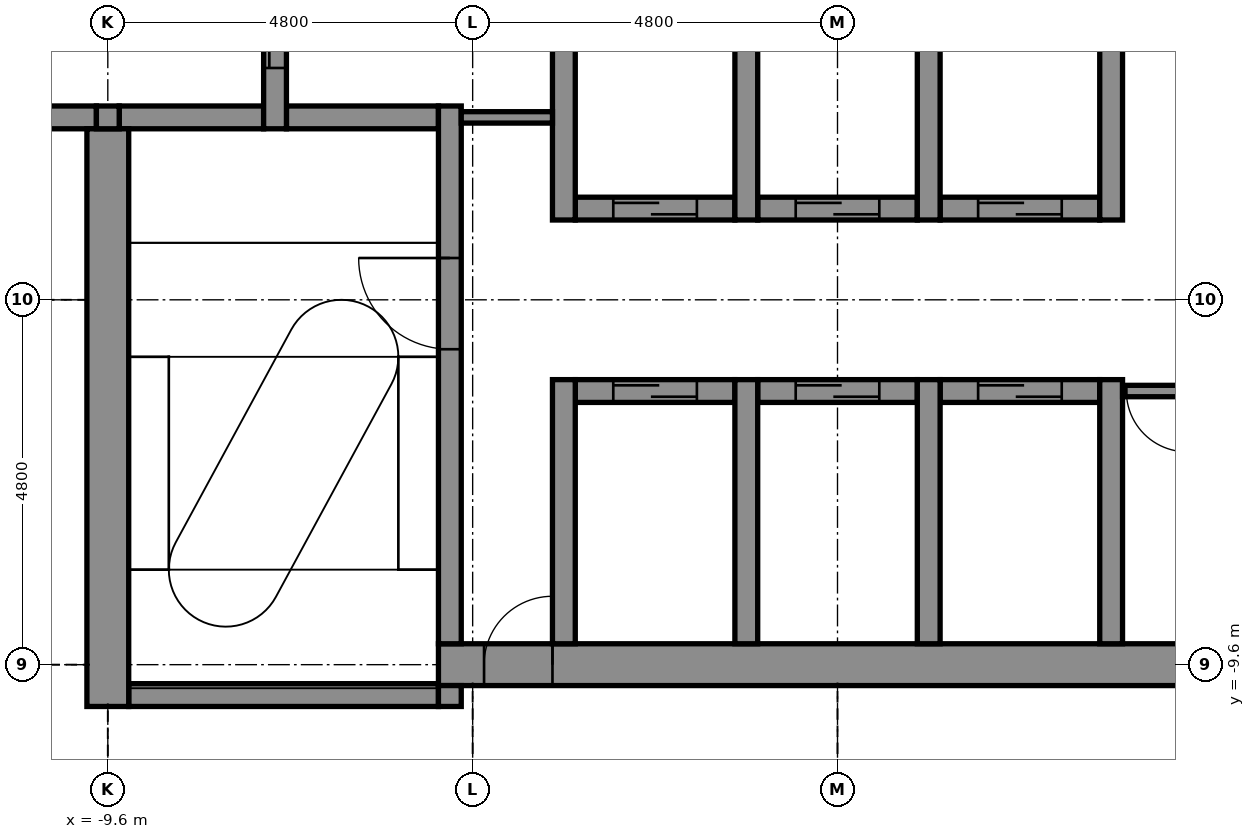
"""IFC4 building model, lengths in metres.
Left out: names, types, materials, properties, quantities, classifications, styles, units other than length and angle.
Written with IfcOpenShell. Run it as: python <this file> out.ifc"""

import sys

from ifc_helpers import new_model, si_unit, direction, frame, frame_2d, origin, place, context, subcontext, project, spatial, rectangle, extrude, element, fill, save


model = new_model("IFC4")
c1 = context("Model", 3, precision=1e-05, world=origin(), true_north=direction((0.0, 1.0)))
c2 = subcontext(c1, "Body", "Model", "MODEL_VIEW")
j1 = project(units=[si_unit("LENGTHUNIT", "METRE"), si_unit("PLANEANGLEUNIT", "RADIAN")], contexts=[c1])
p1 = place(None, origin())
s1 = spatial("IfcSite", under=j1, at=p1, CompositionType="ELEMENT")
p2 = place(p1, origin())
s2 = spatial("IfcBuilding", under=s1, at=p2, CompositionType="ELEMENT")
p3 = place(p2, frame((0.0, 0.0, 273.5)))
s3 = spatial("IfcBuildingStorey", under=s2, at=p3, CompositionType="ELEMENT", Elevation=273.5)
p4 = place(p3, frame((-9.325, -10.0, -0.15), z_axis=(0.0, 0.0, 1.0), x_axis=(1.0, 0.0, 0.0)))
e1 = element("IfcWall", 1, at=p4, inside=s3, PredefinedType="STANDARD", context=c2, shape_type="SweptSolid", body=[
    extrude(rectangle(XDim=4.075, YDim=0.3, at=frame_2d((2.038, 0.0))), origin(), (0.0, 0.0, 1.0), 3.9),
])
p5 = place(p3, frame((-5.25, -9.6, -0.15), z_axis=(0.0, 0.0, 1.0), x_axis=(1.0, 0.0, 0.0)))
e2 = element("IfcWall", 2, at=p5, inside=s3, PredefinedType="SHEAR", context=c2, shape_type="SweptSolid", body=[
    extrude(rectangle(XDim=10.2, YDim=0.55, at=frame_2d((5.1, 0.0))), origin(), (0.0, 0.0, 1.0), 3.9),
])
p6 = place(p5, frame((0.6, 0.0, 0.15)))
e3 = element("IfcOpeningElement", 3, at=p6, cuts=e2, PredefinedType="OPENING", context=c2, shape_type="SweptSolid", body=[
    extrude(rectangle(XDim=0.9, YDim=2.1, at=frame_2d((0.45, 1.05))), frame((0.0, 0.285, 0.0), z_axis=(0.0, -1.0, 0.0), x_axis=(1.0, 0.0, 0.0)), (0.0, 0.0, 1.0), 0.57),
])
p7 = place(p3, frame((-3.45, -6.0, -0.15), z_axis=(0.0, 0.0, 1.0), x_axis=(1.0, 0.0, 0.0)))
e4 = element("IfcWall", 4, at=p7, inside=s3, PredefinedType="STANDARD", context=c2, shape_type="SweptSolid", body=[
    extrude(rectangle(XDim=2.1, YDim=0.3, at=frame_2d((1.05, 0.0))), origin(), (0.0, 0.0, 1.0), 3.9),
])
p8 = place(p7, frame((0.5, 0.0, 0.15)))
e5 = element("IfcOpeningElement", 5, at=p8, cuts=e4, PredefinedType="OPENING", context=c2, shape_type="SweptSolid", body=[
    extrude(rectangle(XDim=1.1, YDim=2.1, at=frame_2d((0.55, 1.05))), frame((0.0, 0.16, 0.0), z_axis=(0.0, -1.0, 0.0), x_axis=(1.0, 0.0, 0.0)), (0.0, 0.0, 1.0), 0.32),
])
p9 = place(p3, frame((-1.05, -6.0, -0.15), z_axis=(0.0, 0.0, 1.0), x_axis=(1.0, 0.0, 0.0)))
e6 = element("IfcWall", 6, at=p9, inside=s3, PredefinedType="STANDARD", context=c2, shape_type="SweptSolid", body=[
    extrude(rectangle(XDim=2.1, YDim=0.3, at=frame_2d((1.05, 0.0))), origin(), (0.0, 0.0, 1.0), 3.9),
])
p10 = place(p9, frame((0.5, 0.0, 0.15)))
e7 = element("IfcOpeningElement", 7, at=p10, cuts=e6, PredefinedType="OPENING", context=c2, shape_type="SweptSolid", body=[
    extrude(rectangle(XDim=1.1, YDim=2.1, at=frame_2d((0.55, 1.05))), frame((0.0, 0.16, 0.0), z_axis=(0.0, -1.0, 0.0), x_axis=(1.0, 0.0, 0.0)), (0.0, 0.0, 1.0), 0.32),
])
p11 = place(p3, frame((1.35, -6.0, -0.15), z_axis=(0.0, 0.0, 1.0), x_axis=(1.0, 0.0, 0.0)))
e8 = element("IfcWall", 8, at=p11, inside=s3, PredefinedType="STANDARD", context=c2, shape_type="SweptSolid", body=[
    extrude(rectangle(XDim=2.1, YDim=0.3, at=frame_2d((1.05, 0.0))), origin(), (0.0, 0.0, 1.0), 3.9),
])
p12 = place(p11, frame((0.5, 0.0, 0.15)))
e9 = element("IfcOpeningElement", 9, at=p12, cuts=e8, PredefinedType="OPENING", context=c2, shape_type="SweptSolid", body=[
    extrude(rectangle(XDim=1.1, YDim=2.1, at=frame_2d((0.55, 1.05))), frame((0.0, 0.16, 0.0), z_axis=(0.0, -1.0, 0.0), x_axis=(1.0, 0.0, 0.0)), (0.0, 0.0, 1.0), 0.32),
])
p13 = place(p3, frame((-3.45, -3.6, -0.15), z_axis=(0.0, 0.0, 1.0), x_axis=(1.0, 0.0, 0.0)))
e10 = element("IfcWall", 10, at=p13, inside=s3, PredefinedType="STANDARD", context=c2, shape_type="SweptSolid", body=[
    extrude(rectangle(XDim=2.1, YDim=0.3, at=frame_2d((1.05, 0.0))), origin(), (0.0, 0.0, 1.0), 3.9),
])
p14 = place(p13, frame((0.5, 0.0, 0.15)))
e11 = element("IfcOpeningElement", 11, at=p14, cuts=e10, PredefinedType="OPENING", context=c2, shape_type="SweptSolid", body=[
    extrude(rectangle(XDim=1.1, YDim=2.1, at=frame_2d((0.55, 1.05))), frame((0.0, 0.16, 0.0), z_axis=(0.0, -1.0, 0.0), x_axis=(1.0, 0.0, 0.0)), (0.0, 0.0, 1.0), 0.32),
])
p15 = place(p3, frame((-1.05, -3.6, -0.15), z_axis=(0.0, 0.0, 1.0), x_axis=(1.0, 0.0, 0.0)))
e12 = element("IfcWall", 12, at=p15, inside=s3, PredefinedType="STANDARD", context=c2, shape_type="SweptSolid", body=[
    extrude(rectangle(XDim=2.1, YDim=0.3, at=frame_2d((1.05, 0.0))), origin(), (0.0, 0.0, 1.0), 3.9),
])
p16 = place(p15, frame((0.5, 0.0, 0.15)))
e13 = element("IfcOpeningElement", 13, at=p16, cuts=e12, PredefinedType="OPENING", context=c2, shape_type="SweptSolid", body=[
    extrude(rectangle(XDim=1.1, YDim=2.1, at=frame_2d((0.55, 1.05))), frame((0.0, 0.16, 0.0), z_axis=(0.0, -1.0, 0.0), x_axis=(1.0, 0.0, 0.0)), (0.0, 0.0, 1.0), 0.32),
])
p17 = place(p3, frame((1.35, -3.6, -0.15), z_axis=(0.0, 0.0, 1.0), x_axis=(1.0, 0.0, 0.0)))
e14 = element("IfcWall", 14, at=p17, inside=s3, PredefinedType="STANDARD", context=c2, shape_type="SweptSolid", body=[
    extrude(rectangle(XDim=2.1, YDim=0.3, at=frame_2d((1.05, 0.0))), origin(), (0.0, 0.0, 1.0), 3.9),
])
p18 = place(p17, frame((0.5, 0.0, 0.15)))
e15 = element("IfcOpeningElement", 15, at=p18, cuts=e14, PredefinedType="OPENING", context=c2, shape_type="SweptSolid", body=[
    extrude(rectangle(XDim=1.1, YDim=2.1, at=frame_2d((0.55, 1.05))), frame((0.0, 0.16, 0.0), z_axis=(0.0, -1.0, 0.0), x_axis=(1.0, 0.0, 0.0)), (0.0, 0.0, 1.0), 0.32),
])
p19 = place(p3, frame((-10.85, -2.4, -0.15), z_axis=(0.0, 0.0, 1.0), x_axis=(1.0, 0.0, 0.0)))
e16 = element("IfcWall", 16, at=p19, inside=s3, PredefinedType="STANDARD", context=c2, shape_type="SweptSolid", body=[
    extrude(rectangle(XDim=1.1, YDim=0.3, at=frame_2d((0.55, 0.0))), origin(), (0.0, 0.0, 1.0), 3.9),
])
p20 = place(p3, frame((-9.45, -2.4, -0.15), z_axis=(0.0, 0.0, 1.0), x_axis=(1.0, 0.0, 0.0)))
e17 = element("IfcWall", 17, at=p20, inside=s3, PredefinedType="STANDARD", context=c2, shape_type="SweptSolid", body=[
    extrude(rectangle(XDim=1.9, YDim=0.3, at=frame_2d((0.95, 0.0))), origin(), (0.0, 0.0, 1.0), 3.9),
])
p21 = place(p3, frame((-7.25, -2.4, -0.15), z_axis=(0.0, 0.0, 1.0), x_axis=(1.0, 0.0, 0.0)))
e18 = element("IfcWall", 18, at=p21, inside=s3, PredefinedType="STANDARD", context=c2, shape_type="SweptSolid", body=[
    extrude(rectangle(XDim=2.0, YDim=0.3, at=frame_2d((1.0, 0.0))), origin(), (0.0, 0.0, 1.0), 3.9),
])
p22 = place(p3, frame((-9.6, -10.15, -0.15), z_axis=(0.0, 0.0, 1.0), x_axis=(0.0, 1.0, 0.0)))
e19 = element("IfcWall", 19, at=p22, inside=s3, PredefinedType="SHEAR", context=c2, shape_type="SweptSolid", body=[
    extrude(rectangle(XDim=7.6, YDim=0.55, at=frame_2d((3.8, 0.0))), origin(), (0.0, 0.0, 1.0), 3.9),
])
p23 = place(p3, frame((-9.6, -2.55, -0.15), z_axis=(0.0, 0.0, 1.0), x_axis=(0.0, 1.0, 0.0)))
e20 = element("IfcWall", 20, at=p23, inside=s3, PredefinedType="STANDARD", context=c2, shape_type="SweptSolid", body=[
    extrude(rectangle(XDim=0.3, YDim=0.3, at=frame_2d((0.15, 0.0))), origin(), (0.0, 0.0, 1.0), 3.9),
])
p24 = place(p3, frame((-7.4, -2.55, -0.15), z_axis=(0.0, 0.0, 1.0), x_axis=(0.0, 1.0, 0.0)))
e21 = element("IfcWall", 21, at=p24, inside=s3, PredefinedType="STANDARD", context=c2, shape_type="SweptSolid", body=[
    extrude(rectangle(XDim=5.1, YDim=0.3, at=frame_2d((2.55, 0.0))), origin(), (0.0, 0.0, 1.0), 3.9),
])
p25 = place(p24, frame((0.8, 0.0, 0.15)))
e22 = element("IfcOpeningElement", 22, at=p25, cuts=e21, PredefinedType="OPENING", context=c2, shape_type="SweptSolid", body=[
    extrude(rectangle(XDim=1.1, YDim=2.1, at=frame_2d((0.55, 1.05))), frame((0.0, 0.16, 0.0), z_axis=(0.0, -1.0, 0.0), x_axis=(1.0, 0.0, 0.0)), (0.0, 0.0, 1.0), 0.32),
])
p26 = place(p24, frame((3.2, 0.0, 0.15)))
e23 = element("IfcOpeningElement", 23, at=p26, cuts=e21, PredefinedType="OPENING", context=c2, shape_type="SweptSolid", body=[
    extrude(rectangle(XDim=1.1, YDim=2.1, at=frame_2d((0.55, 1.05))), frame((0.0, 0.16, 0.0), z_axis=(0.0, -1.0, 0.0), x_axis=(1.0, 0.0, 0.0)), (0.0, 0.0, 1.0), 0.32),
])
p27 = place(p3, frame((-5.1, -10.15, -0.15), z_axis=(0.0, 0.0, 1.0), x_axis=(0.0, 1.0, 0.0)))
e24 = element("IfcWall", 24, at=p27, inside=s3, PredefinedType="STANDARD", context=c2, shape_type="SweptSolid", body=[
    extrude(rectangle(XDim=0.275, YDim=0.3, at=frame_2d((0.137, 0.0))), origin(), (0.0, 0.0, 1.0), 3.9),
])
p28 = place(p3, frame((-5.1, -9.325, -0.15), z_axis=(0.0, 0.0, 1.0), x_axis=(0.0, 1.0, 0.0)))
e25 = element("IfcWall", 25, at=p28, inside=s3, PredefinedType="STANDARD", context=c2, shape_type="SweptSolid", body=[
    extrude(rectangle(XDim=7.075, YDim=0.3, at=frame_2d((3.538, 0.0))), origin(), (0.0, 0.0, 1.0), 3.9),
])
p29 = place(p28, frame((3.875, 0.0, 0.15)))
e26 = element("IfcOpeningElement", 26, at=p29, cuts=e25, PredefinedType="OPENING", context=c2, shape_type="SweptSolid", body=[
    extrude(rectangle(XDim=1.2, YDim=2.1, at=frame_2d((0.6, 1.05))), frame((0.0, 0.16, 0.0), z_axis=(0.0, -1.0, 0.0), x_axis=(1.0, 0.0, 0.0)), (0.0, 0.0, 1.0), 0.32),
])
p30 = place(p3, frame((-3.6, -9.325, -0.15), z_axis=(0.0, 0.0, 1.0), x_axis=(0.0, 1.0, 0.0)))
e27 = element("IfcWall", 27, at=p30, inside=s3, PredefinedType="STANDARD", context=c2, shape_type="SweptSolid", body=[
    extrude(rectangle(XDim=3.475, YDim=0.3, at=frame_2d((1.737, 0.0))), origin(), (0.0, 0.0, 1.0), 3.9),
])
p31 = place(p3, frame((-3.6, -3.75, -0.15), z_axis=(0.0, 0.0, 1.0), x_axis=(0.0, 1.0, 0.0)))
e28 = element("IfcWall", 28, at=p31, inside=s3, PredefinedType="STANDARD", context=c2, shape_type="SweptSolid", body=[
    extrude(rectangle(XDim=7.5, YDim=0.3, at=frame_2d((3.75, 0.0))), origin(), (0.0, 0.0, 1.0), 3.9),
])
p32 = place(p3, frame((-1.2, -9.325, -0.15), z_axis=(0.0, 0.0, 1.0), x_axis=(0.0, 1.0, 0.0)))
e29 = element("IfcWall", 29, at=p32, inside=s3, PredefinedType="STANDARD", context=c2, shape_type="SweptSolid", body=[
    extrude(rectangle(XDim=3.475, YDim=0.3, at=frame_2d((1.737, 0.0))), origin(), (0.0, 0.0, 1.0), 3.9),
])
p33 = place(p3, frame((-1.2, -3.75, -0.15), z_axis=(0.0, 0.0, 1.0), x_axis=(0.0, 1.0, 0.0)))
e30 = element("IfcWall", 30, at=p33, inside=s3, PredefinedType="STANDARD", context=c2, shape_type="SweptSolid", body=[
    extrude(rectangle(XDim=7.5, YDim=0.3, at=frame_2d((3.75, 0.0))), origin(), (0.0, 0.0, 1.0), 3.9),
])
p34 = place(p3, frame((1.2, -9.325, -0.15), z_axis=(0.0, 0.0, 1.0), x_axis=(0.0, 1.0, 0.0)))
e31 = element("IfcWall", 31, at=p34, inside=s3, PredefinedType="STANDARD", context=c2, shape_type="SweptSolid", body=[
    extrude(rectangle(XDim=3.475, YDim=0.3, at=frame_2d((1.737, 0.0))), origin(), (0.0, 0.0, 1.0), 3.9),
])
p35 = place(p3, frame((1.2, -3.75, -0.15), z_axis=(0.0, 0.0, 1.0), x_axis=(0.0, 1.0, 0.0)))
e32 = element("IfcWall", 32, at=p35, inside=s3, PredefinedType="STANDARD", context=c2, shape_type="SweptSolid", body=[
    extrude(rectangle(XDim=7.5, YDim=0.3, at=frame_2d((3.75, 0.0))), origin(), (0.0, 0.0, 1.0), 3.9),
])
p36 = place(p3, frame((3.6, -9.325, -0.15), z_axis=(0.0, 0.0, 1.0), x_axis=(0.0, 1.0, 0.0)))
e33 = element("IfcWall", 33, at=p36, inside=s3, PredefinedType="STANDARD", context=c2, shape_type="SweptSolid", body=[
    extrude(rectangle(XDim=3.475, YDim=0.3, at=frame_2d((1.737, 0.0))), origin(), (0.0, 0.0, 1.0), 3.9),
])
p37 = place(p3, frame((3.6, -3.75, -0.15), z_axis=(0.0, 0.0, 1.0), x_axis=(0.0, 1.0, 0.0)))
e34 = element("IfcWall", 34, at=p37, inside=s3, PredefinedType="STANDARD", context=c2, shape_type="SweptSolid", body=[
    extrude(rectangle(XDim=7.5, YDim=0.3, at=frame_2d((3.75, 0.0))), origin(), (0.0, 0.0, 1.0), 3.9),
])
p38 = place(p3, frame((3.75, -6.0, 0.0), z_axis=(0.0, 0.0, 1.0), x_axis=(1.0, 0.0, 0.0)))
e35 = element("IfcWall", 35, at=p38, inside=s3, PredefinedType="PARTITIONING", context=c2, shape_type="SweptSolid", body=[
    extrude(rectangle(XDim=0.9, YDim=0.15, at=frame_2d((0.45, 0.0))), origin(), (0.0, 0.0, 1.0), 3.75),
])
p39 = place(p38, frame((0.05, 0.0, 0.0)))
e36 = element("IfcOpeningElement", 36, at=p39, cuts=e35, PredefinedType="OPENING", context=c2, shape_type="SweptSolid", body=[
    extrude(rectangle(XDim=0.8, YDim=2.1, at=frame_2d((0.4, 1.05))), frame((0.0, 0.085, 0.0), z_axis=(0.0, -1.0, 0.0), x_axis=(1.0, 0.0, 0.0)), (0.0, 0.0, 1.0), 0.17),
])
p40 = place(p3, frame((-4.95, -2.4, 0.0), z_axis=(0.0, 0.0, 1.0), x_axis=(1.0, 0.0, 0.0)))
e37 = element("IfcWall", 37, at=p40, inside=s3, PredefinedType="PARTITIONING", context=c2, shape_type="SweptSolid", body=[
    extrude(rectangle(XDim=1.2, YDim=0.15, at=frame_2d((0.6, 0.0))), origin(), (0.0, 0.0, 1.0), 3.75),
])
p41 = place(p39, frame((0.8, 0.0, 0.0), z_axis=(0.0, 0.0, 1.0), x_axis=(-1.0, 0.0, 0.0)))
e38 = element("IfcDoor", 38, at=p41, inside=s3, OperationType="SINGLE_SWING_RIGHT", PredefinedType="DOOR", context=c2, shape_type="SweptSolid", body=[
    extrude(rectangle(XDim=0.8, YDim=2.1, at=frame_2d((0.4, 1.05))), frame((0.0, 0.025, 0.0), z_axis=(0.0, -1.0, 0.0), x_axis=(1.0, 0.0, 0.0)), (0.0, 0.0, 1.0), 0.05),
])
fill(e36, e38)
p42 = place(p25, origin())
e39 = element("IfcDoor", 39, at=p42, inside=s3, OperationType="DOUBLE_DOOR_SLIDING", PredefinedType="DOOR", context=c2, shape_type="SweptSolid", body=[
    extrude(rectangle(XDim=1.1, YDim=2.1, at=frame_2d((0.55, 1.05))), frame((0.0, 0.025, 0.0), z_axis=(0.0, -1.0, 0.0), x_axis=(1.0, 0.0, 0.0)), (0.0, 0.0, 1.0), 0.05),
])
fill(e22, e39)
p43 = place(p14, origin())
e40 = element("IfcDoor", 40, at=p43, inside=s3, OperationType="DOUBLE_DOOR_SLIDING", PredefinedType="DOOR", context=c2, shape_type="SweptSolid", body=[
    extrude(rectangle(XDim=1.1, YDim=2.1, at=frame_2d((0.55, 1.05))), frame((0.0, 0.025, 0.0), z_axis=(0.0, -1.0, 0.0), x_axis=(1.0, 0.0, 0.0)), (0.0, 0.0, 1.0), 0.05),
])
fill(e11, e40)
p44 = place(p16, origin())
e41 = element("IfcDoor", 41, at=p44, inside=s3, OperationType="DOUBLE_DOOR_SLIDING", PredefinedType="DOOR", context=c2, shape_type="SweptSolid", body=[
    extrude(rectangle(XDim=1.1, YDim=2.1, at=frame_2d((0.55, 1.05))), frame((0.0, 0.025, 0.0), z_axis=(0.0, -1.0, 0.0), x_axis=(1.0, 0.0, 0.0)), (0.0, 0.0, 1.0), 0.05),
])
fill(e13, e41)
p45 = place(p18, origin())
e42 = element("IfcDoor", 42, at=p45, inside=s3, OperationType="DOUBLE_DOOR_SLIDING", PredefinedType="DOOR", context=c2, shape_type="SweptSolid", body=[
    extrude(rectangle(XDim=1.1, YDim=2.1, at=frame_2d((0.55, 1.05))), frame((0.0, 0.025, 0.0), z_axis=(0.0, -1.0, 0.0), x_axis=(1.0, 0.0, 0.0)), (0.0, 0.0, 1.0), 0.05),
])
fill(e15, e42)
p46 = place(p8, origin())
e43 = element("IfcDoor", 43, at=p46, inside=s3, OperationType="DOUBLE_DOOR_SLIDING", PredefinedType="DOOR", context=c2, shape_type="SweptSolid", body=[
    extrude(rectangle(XDim=1.1, YDim=2.1, at=frame_2d((0.55, 1.05))), frame((0.0, 0.025, 0.0), z_axis=(0.0, -1.0, 0.0), x_axis=(1.0, 0.0, 0.0)), (0.0, 0.0, 1.0), 0.05),
])
fill(e5, e43)
p47 = place(p10, origin())
e44 = element("IfcDoor", 44, at=p47, inside=s3, OperationType="DOUBLE_DOOR_SLIDING", PredefinedType="DOOR", context=c2, shape_type="SweptSolid", body=[
    extrude(rectangle(XDim=1.1, YDim=2.1, at=frame_2d((0.55, 1.05))), frame((0.0, 0.025, 0.0), z_axis=(0.0, -1.0, 0.0), x_axis=(1.0, 0.0, 0.0)), (0.0, 0.0, 1.0), 0.05),
])
fill(e7, e44)
p48 = place(p12, origin())
e45 = element("IfcDoor", 45, at=p48, inside=s3, OperationType="DOUBLE_DOOR_SLIDING", PredefinedType="DOOR", context=c2, shape_type="SweptSolid", body=[
    extrude(rectangle(XDim=1.1, YDim=2.1, at=frame_2d((0.55, 1.05))), frame((0.0, 0.025, 0.0), z_axis=(0.0, -1.0, 0.0), x_axis=(1.0, 0.0, 0.0)), (0.0, 0.0, 1.0), 0.05),
])
fill(e9, e45)
p49 = place(p29, origin())
e46 = element("IfcDoor", 46, at=p49, inside=s3, OperationType="SINGLE_SWING_RIGHT", PredefinedType="DOOR", context=c2, shape_type="SweptSolid", body=[
    extrude(rectangle(XDim=1.2, YDim=2.1, at=frame_2d((0.6, 1.05))), frame((0.0, 0.025, 0.0), z_axis=(0.0, -1.0, 0.0), x_axis=(1.0, 0.0, 0.0)), (0.0, 0.0, 1.0), 0.05),
])
fill(e26, e46)
p50 = place(p6, origin())
e47 = element("IfcDoor", 47, at=p50, inside=s3, OperationType="SINGLE_SWING_RIGHT", PredefinedType="DOOR", context=c2, shape_type="SweptSolid", body=[
    extrude(rectangle(XDim=0.9, YDim=2.1, at=frame_2d((0.45, 1.05))), frame((0.0, 0.025, 0.0), z_axis=(0.0, -1.0, 0.0), x_axis=(1.0, 0.0, 0.0)), (0.0, 0.0, 1.0), 0.05),
])
fill(e3, e47)
save(model, sys.argv[1])
